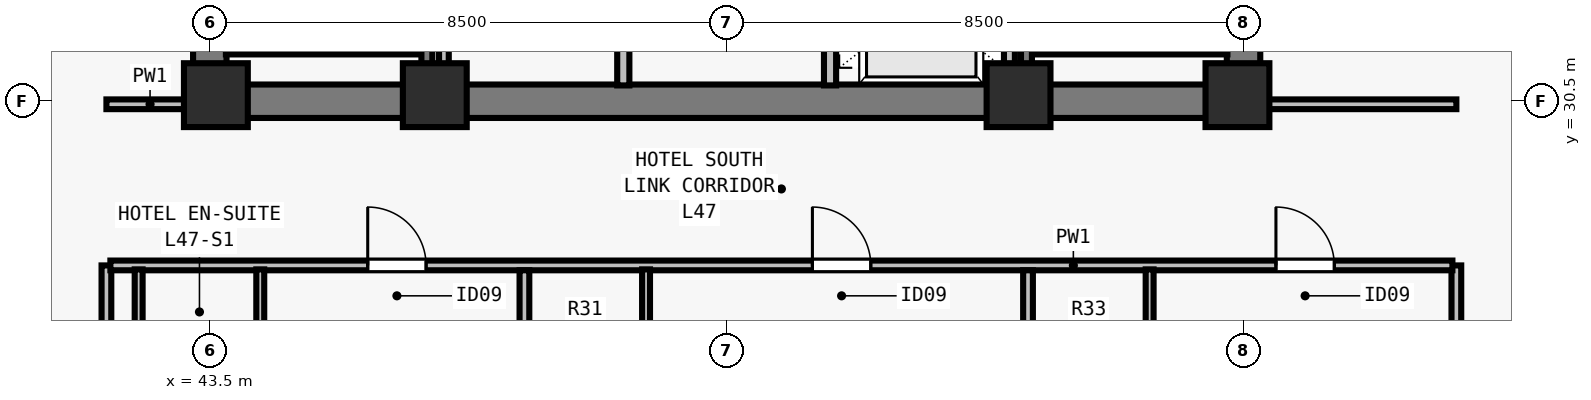
"""IFC4 building model, lengths in metres.
Left out: names, types, materials, properties, quantities, classifications, styles, units other than length and angle.
Written with IfcOpenShell. Run it as: python <this file> out.ifc"""

import sys

from ifc_helpers import new_model, si_unit, direction, frame, frame_2d, origin, origin_2d, place, context, subcontext, project, spatial, rectangle, extrude, element, fill, save


model = new_model("IFC4")
c1 = context("Model", 3, precision=1e-05, world=origin(), true_north=direction((0.0, 1.0)))
c2 = subcontext(c1, "Body", "Model", "MODEL_VIEW")
j1 = project(units=[si_unit("LENGTHUNIT", "METRE"), si_unit("PLANEANGLEUNIT", "RADIAN")], contexts=[c1])
p1 = place(None, origin())
s1 = spatial("IfcSite", under=j1, at=p1, CompositionType="ELEMENT")
p2 = place(p1, origin())
s2 = spatial("IfcBuilding", under=s1, at=p2, CompositionType="ELEMENT")
p3 = place(p2, frame((0.0, 0.0, 172.5)))
s3 = spatial("IfcBuildingStorey", under=s2, at=p3, CompositionType="ELEMENT", Elevation=172.5)
for number, where, z_axis, x_axis in (
    (1, (43.6, 30.6, 0.0), (0.0, 0.0, 1.0), (1.0, 0.0, 0.0)),
    (2, (47.2, 30.6, 0.0), (0.0, 0.0, 1.0), (1.0, 0.0, 0.0)),
    (3, (56.8, 30.6, 0.0), (0.0, 0.0, 1.0), (1.0, 0.0, 0.0)),
    (4, (60.4, 30.6, 0.0), (0.0, 0.0, 1.0), (1.0, 0.0, 0.0)),
):
    element("IfcColumn", number, at=place(p3, frame(where, z_axis=z_axis, x_axis=x_axis)), inside=s3, PredefinedType="COLUMN", context=c2, shape_type="SweptSolid", body=[
        extrude(rectangle(XDim=1.05, YDim=1.05, at=origin_2d()), origin(), (0.0, 0.0, 1.0), 3.5),
    ])
p4 = place(p3, frame((43.225, 30.5, 0.0), z_axis=(0.0, 0.0, 1.0), x_axis=(1.0, 0.0, 0.0)))
e5 = element("IfcWall", 5, at=p4, inside=s3, PredefinedType="SHEAR", context=c2, shape_type="SweptSolid", body=[
    extrude(rectangle(XDim=17.55, YDim=0.55, at=frame_2d((8.775, 0.0))), origin(), (0.0, 0.0, 1.0), 3.28),
])
for number, where, z_axis, x_axis in (
    (6, (43.5, 30.765, 0.0), (0.0, 0.0, 1.0), (0.0, 1.0, 0.0)),
    (7, (60.5, 30.765, 0.0), (0.0, 0.0, 1.0), (0.0, 1.0, 0.0)),
):
    element("IfcWall", number, at=place(p3, frame(where, z_axis=z_axis, x_axis=x_axis)), inside=s3, PredefinedType="SHEAR", context=c2, shape_type="SweptSolid", body=[
        extrude(rectangle(XDim=7.985, YDim=0.55, at=frame_2d((3.993, 0.0))), origin(), (0.0, 0.0, 1.0), 3.28),
    ])
p5 = place(p3, frame((50.3, 30.76, 0.0), z_axis=(0.0, 0.0, 1.0), x_axis=(0.0, 1.0, 0.0)))
e8 = element("IfcWall", 8, at=p5, inside=s3, PredefinedType="SOLIDWALL", context=c2, shape_type="SweptSolid", body=[
    extrude(rectangle(XDim=7.855, YDim=0.2, at=frame_2d((3.927, 0.0))), origin(), (0.0, 0.0, 1.0), 3.28),
])
p6 = place(p5, frame((1.34, 0.0, 0.0)))
e9 = element("IfcOpeningElement", 9, at=p6, cuts=e8, PredefinedType="OPENING", context=c2, shape_type="SweptSolid", body=[
    extrude(rectangle(XDim=0.9, YDim=2.12, at=frame_2d((0.45, 1.06))), frame((0.0, 0.11, 0.0), z_axis=(0.0, -1.0, 0.0), x_axis=(1.0, 0.0, 0.0)), (0.0, 0.0, 1.0), 0.22),
])
p7 = place(p5, frame((5.34, 0.0, 0.0)))
e10 = element("IfcOpeningElement", 10, at=p7, cuts=e8, PredefinedType="OPENING", context=c2, shape_type="SweptSolid", body=[
    extrude(rectangle(XDim=0.9, YDim=2.12, at=frame_2d((0.45, 1.06))), frame((0.0, 0.11, 0.0), z_axis=(0.0, -1.0, 0.0), x_axis=(1.0, 0.0, 0.0)), (0.0, 0.0, 1.0), 0.22),
])
p8 = place(p3, frame((53.7, 30.76, 0.0), z_axis=(0.0, 0.0, 1.0), x_axis=(0.0, 1.0, 0.0)))
e11 = element("IfcWall", 11, at=p8, inside=s3, PredefinedType="SOLIDWALL", context=c2, shape_type="SweptSolid", body=[
    extrude(rectangle(XDim=7.855, YDim=0.2, at=frame_2d((3.927, 0.0))), origin(), (0.0, 0.0, 1.0), 3.28),
])
p9 = place(p8, frame((0.79, 0.0, 0.0)))
e12 = element("IfcOpeningElement", 12, at=p9, cuts=e11, PredefinedType="OPENING", context=c2, shape_type="SweptSolid", body=[
    extrude(rectangle(XDim=1.1, YDim=2.2, at=frame_2d((0.55, 1.1))), frame((0.0, 0.11, 0.0), z_axis=(0.0, -1.0, 0.0), x_axis=(1.0, 0.0, 0.0)), (0.0, 0.0, 1.0), 0.22),
])
p10 = place(p8, frame((3.49, 0.0, 0.0)))
e13 = element("IfcOpeningElement", 13, at=p10, cuts=e11, PredefinedType="OPENING", context=c2, shape_type="SweptSolid", body=[
    extrude(rectangle(XDim=1.1, YDim=2.2, at=frame_2d((0.55, 1.1))), frame((0.0, 0.11, 0.0), z_axis=(0.0, -1.0, 0.0), x_axis=(1.0, 0.0, 0.0)), (0.0, 0.0, 1.0), 0.22),
])
p11 = place(p8, frame((6.19, 0.0, 0.0)))
e14 = element("IfcOpeningElement", 14, at=p11, cuts=e11, PredefinedType="OPENING", context=c2, shape_type="SweptSolid", body=[
    extrude(rectangle(XDim=1.1, YDim=2.2, at=frame_2d((0.55, 1.1))), frame((0.0, 0.11, 0.0), z_axis=(0.0, -1.0, 0.0), x_axis=(1.0, 0.0, 0.0)), (0.0, 0.0, 1.0), 0.22),
])
p12 = place(p3, frame((47.35, 30.76, 0.0), z_axis=(0.0, 0.0, 1.0), x_axis=(0.0, 1.0, 0.0)))
e15 = element("IfcWall", 15, at=p12, inside=s3, PredefinedType="PARTITIONING", context=c2, shape_type="SweptSolid", body=[
    extrude(rectangle(XDim=7.855, YDim=0.16, at=frame_2d((3.927, 0.0))), origin(), (0.0, 0.0, 1.0), 3.28),
])
p13 = place(p3, frame((56.65, 30.76, 0.0), z_axis=(0.0, 0.0, 1.0), x_axis=(0.0, 1.0, 0.0)))
e16 = element("IfcWall", 16, at=p13, inside=s3, PredefinedType="SOLIDWALL", context=c2, shape_type="SweptSolid", body=[
    extrude(rectangle(XDim=7.855, YDim=0.18, at=frame_2d((3.927, 0.0))), origin(), (0.0, 0.0, 1.0), 3.28),
])
p14 = place(p3, frame((41.8, 15.325, 0.0), z_axis=(0.0, 0.0, 1.0), x_axis=(0.0, 1.0, 0.0)))
e17 = element("IfcWall", 17, at=p14, inside=s3, PredefinedType="PARTITIONING", context=c2, shape_type="SweptSolid", body=[
    extrude(rectangle(XDim=12.475, YDim=0.16, at=frame_2d((6.238, 0.0))), origin(), (0.0, 0.0, 1.0), 3.28),
])
p15 = place(p3, frame((41.8, 30.45, 0.0), z_axis=(0.0, 0.0, 1.0), x_axis=(1.0, 0.0, 0.0)))
e18 = element("IfcWall", 18, at=p15, inside=s3, PredefinedType="PARTITIONING", context=c2, shape_type="SweptSolid", body=[
    extrude(rectangle(XDim=1.435, YDim=0.16, at=frame_2d((0.718, 0.0))), origin(), (0.0, 0.0, 1.0), 3.28),
])
p16 = place(p3, frame((64.0, 15.325, 0.0), z_axis=(0.0, 0.0, 1.0), x_axis=(0.0, 1.0, 0.0)))
e19 = element("IfcWall", 19, at=p16, inside=s3, PredefinedType="PARTITIONING", context=c2, shape_type="SweptSolid", body=[
    extrude(rectangle(XDim=12.475, YDim=0.16, at=frame_2d((6.238, 0.0))), origin(), (0.0, 0.0, 1.0), 2.555),
])
p17 = place(p3, frame((60.765, 30.45, 0.0), z_axis=(0.0, 0.0, 1.0), x_axis=(1.0, 0.0, 0.0)))
e20 = element("IfcWall", 20, at=p17, inside=s3, PredefinedType="PARTITIONING", context=c2, shape_type="SweptSolid", body=[
    extrude(rectangle(XDim=3.235, YDim=0.16, at=frame_2d((1.618, 0.0))), origin(), (0.0, 0.0, 1.0), 3.28),
])
p18 = place(p3, frame((41.865, 27.8, 0.0), z_axis=(0.0, 0.0, 1.0), x_axis=(1.0, 0.0, 0.0)))
e21 = element("IfcWall", 21, at=p18, inside=s3, PredefinedType="PARTITIONING", context=c2, shape_type="SweptSolid", body=[
    extrude(rectangle(XDim=22.07, YDim=0.16, at=frame_2d((11.035, 0.0))), origin(), (0.0, 0.0, 1.0), 3.28),
])
p19 = place(p18, frame((4.232, 0.0, 0.0)))
e22 = element("IfcOpeningElement", 22, at=p19, cuts=e21, PredefinedType="OPENING", context=c2, shape_type="SweptSolid", body=[
    extrude(rectangle(XDim=0.96, YDim=2.15, at=frame_2d((0.48, 1.075))), frame((0.0, 0.09, 0.0), z_axis=(0.0, -1.0, 0.0), x_axis=(1.0, 0.0, 0.0)), (0.0, 0.0, 1.0), 0.18),
])
p20 = place(p18, frame((11.545, 0.0, 0.0)))
e23 = element("IfcOpeningElement", 23, at=p20, cuts=e21, PredefinedType="OPENING", context=c2, shape_type="SweptSolid", body=[
    extrude(rectangle(XDim=0.96, YDim=2.15, at=frame_2d((0.48, 1.075))), frame((0.0, 0.09, 0.0), z_axis=(0.0, -1.0, 0.0), x_axis=(1.0, 0.0, 0.0)), (0.0, 0.0, 1.0), 0.18),
])
p21 = place(p18, frame((19.168, 0.0, 0.0)))
e24 = element("IfcOpeningElement", 24, at=p21, cuts=e21, PredefinedType="OPENING", context=c2, shape_type="SweptSolid", body=[
    extrude(rectangle(XDim=0.96, YDim=2.15, at=frame_2d((0.48, 1.075))), frame((0.0, 0.09, 0.0), z_axis=(0.0, -1.0, 0.0), x_axis=(1.0, 0.0, 0.0)), (0.0, 0.0, 1.0), 0.18),
])
for number, where, z_axis, x_axis in (
    (25, (42.33, 25.42, 0.0), (0.0, 0.0, 1.0), (0.0, 1.0, 0.0)),
    (26, (44.33, 25.42, 0.0), (0.0, 0.0, 1.0), (0.0, 1.0, 0.0)),
):
    element("IfcWall", number, at=place(p3, frame(where, z_axis=z_axis, x_axis=x_axis)), inside=s3, PredefinedType="PLUMBINGWALL", context=c2, shape_type="SweptSolid", body=[
        extrude(rectangle(XDim=2.315, YDim=0.13, at=frame_2d((1.158, 0.0))), origin(), (0.0, 0.0, 1.0), 3.28),
    ])
p22 = place(p3, frame((48.674, 15.325, 0.0), z_axis=(0.0, 0.0, 1.0), x_axis=(0.0, 1.0, 0.0)))
e27 = element("IfcWall", 27, at=p22, inside=s3, PredefinedType="PARTITIONING", context=c2, shape_type="SweptSolid", body=[
    extrude(rectangle(XDim=12.395, YDim=0.16, at=frame_2d((6.198, 0.0))), origin(), (0.0, 0.0, 1.0), 2.896),
])
p23 = place(p3, frame((50.674, 25.42, 0.0), z_axis=(0.0, 0.0, 1.0), x_axis=(0.0, 1.0, 0.0)))
e28 = element("IfcWall", 28, at=p23, inside=s3, PredefinedType="PLUMBINGWALL", context=c2, shape_type="SweptSolid", body=[
    extrude(rectangle(XDim=2.315, YDim=0.13, at=frame_2d((1.158, 0.0))), origin(), (0.0, 0.0, 1.0), 3.28),
])
p24 = place(p3, frame((56.956, 15.325, 0.0), z_axis=(0.0, 0.0, 1.0), x_axis=(0.0, 1.0, 0.0)))
e29 = element("IfcWall", 29, at=p24, inside=s3, PredefinedType="PARTITIONING", context=c2, shape_type="SweptSolid", body=[
    extrude(rectangle(XDim=12.395, YDim=0.16, at=frame_2d((6.198, 0.0))), origin(), (0.0, 0.0, 1.0), 2.555),
])
p25 = place(p3, frame((58.956, 25.42, 0.0), z_axis=(0.0, 0.0, 1.0), x_axis=(0.0, 1.0, 0.0)))
e30 = element("IfcWall", 30, at=p25, inside=s3, PredefinedType="PLUMBINGWALL", context=c2, shape_type="SweptSolid", body=[
    extrude(rectangle(XDim=2.315, YDim=0.13, at=frame_2d((1.158, 0.0))), origin(), (0.0, 0.0, 1.0), 3.28),
])
p26 = place(p3, frame((43.765, 31.36, 0.0), z_axis=(0.0, 0.0, 1.0), x_axis=(1.0, 0.0, 0.0)))
e31 = element("IfcWall", 31, at=p26, inside=s3, PredefinedType="SOLIDWALL", context=c2, shape_type="SweptSolid", body=[
    extrude(rectangle(XDim=3.23, YDim=0.18, at=frame_2d((1.615, 0.0))), origin(), (0.0, 0.0, 1.0), 3.28),
])
p27 = place(p3, frame((47.07, 38.78, 0.0), z_axis=(0.0, 0.0, 1.0), x_axis=(0.0, -1.0, 0.0)))
e32 = element("IfcWall", 32, at=p27, inside=s3, PredefinedType="SOLIDWALL", context=c2, shape_type="SweptSolid", body=[
    extrude(rectangle(XDim=8.017, YDim=0.18, at=frame_2d((4.009, 0.0))), origin(), (0.0, 0.0, 1.0), 3.28),
])
p28 = place(p3, frame((57.005, 31.36, 0.0), z_axis=(0.0, 0.0, 1.0), x_axis=(1.0, 0.0, 0.0)))
e33 = element("IfcWall", 33, at=p28, inside=s3, PredefinedType="SOLIDWALL", context=c2, shape_type="SweptSolid", body=[
    extrude(rectangle(XDim=3.23, YDim=0.18, at=frame_2d((1.615, 0.0))), origin(), (0.0, 0.0, 1.0), 3.28),
])
p29 = place(p3, frame((56.93, 38.78, 0.0), z_axis=(0.0, 0.0, 1.0), x_axis=(0.0, -1.0, 0.0)))
e34 = element("IfcWall", 34, at=p29, inside=s3, PredefinedType="SOLIDWALL", context=c2, shape_type="SweptSolid", body=[
    extrude(rectangle(XDim=8.017, YDim=0.18, at=frame_2d((4.009, 0.0))), origin(), (0.0, 0.0, 1.0), 3.28),
])
p30 = place(p19, origin())
e35 = element("IfcDoor", 35, at=p30, inside=s3, OperationType="SINGLE_SWING_LEFT", PredefinedType="DOOR", context=c2, shape_type="SweptSolid", body=[
    extrude(rectangle(XDim=0.96, YDim=2.15, at=frame_2d((0.48, 1.075))), frame((0.0, 0.025, 0.0), z_axis=(0.0, -1.0, 0.0), x_axis=(1.0, 0.0, 0.0)), (0.0, 0.0, 1.0), 0.05),
])
fill(e22, e35)
p31 = place(p20, origin())
e36 = element("IfcDoor", 36, at=p31, inside=s3, OperationType="SINGLE_SWING_LEFT", PredefinedType="DOOR", context=c2, shape_type="SweptSolid", body=[
    extrude(rectangle(XDim=0.96, YDim=2.15, at=frame_2d((0.48, 1.075))), frame((0.0, 0.025, 0.0), z_axis=(0.0, -1.0, 0.0), x_axis=(1.0, 0.0, 0.0)), (0.0, 0.0, 1.0), 0.05),
])
fill(e23, e36)
p32 = place(p21, origin())
e37 = element("IfcDoor", 37, at=p32, inside=s3, OperationType="SINGLE_SWING_LEFT", PredefinedType="DOOR", context=c2, shape_type="SweptSolid", body=[
    extrude(rectangle(XDim=0.96, YDim=2.15, at=frame_2d((0.48, 1.075))), frame((0.0, 0.025, 0.0), z_axis=(0.0, -1.0, 0.0), x_axis=(1.0, 0.0, 0.0)), (0.0, 0.0, 1.0), 0.05),
])
fill(e24, e37)
save(model, sys.argv[1])
